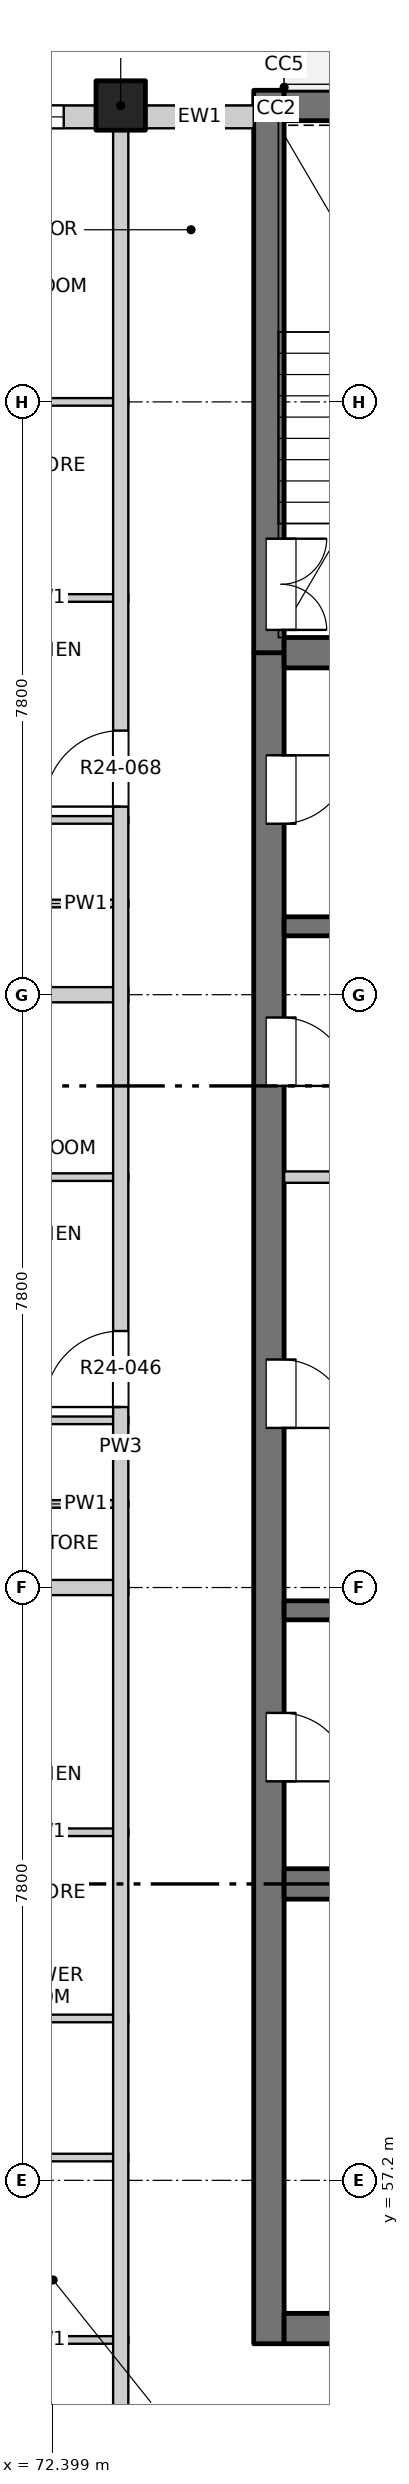
"""IFC4 building model, lengths in metres.
Left out: names, types, materials, properties, quantities, classifications, styles, units other than length and angle.
Written with IfcOpenShell. Run it as: python <this file> out.ifc"""

import sys

from ifc_helpers import new_model, si_unit, direction, frame, frame_2d, origin, origin_2d, place, context, subcontext, project, spatial, rectangle, extrude, element, fill, save


model = new_model("IFC4")
c1 = context("Model", 3, precision=1e-05, world=origin(), true_north=direction((0.0, 1.0)))
c2 = subcontext(c1, "Body", "Model", "MODEL_VIEW")
j1 = project(units=[si_unit("LENGTHUNIT", "METRE"), si_unit("PLANEANGLEUNIT", "RADIAN")], contexts=[c1])
p1 = place(None, origin())
s1 = spatial("IfcSite", under=j1, at=p1, CompositionType="ELEMENT")
p2 = place(p1, origin())
s2 = spatial("IfcBuilding", under=s1, at=p2, CompositionType="ELEMENT")
p3 = place(p2, frame((0.0, 0.0, 246.0)))
s3 = spatial("IfcBuildingStorey", under=s2, at=p3, CompositionType="ELEMENT", Elevation=246.0)
p4 = place(p3, frame((73.3, 84.5, -0.3), z_axis=(0.0, 0.0, 1.0), x_axis=(1.0, 0.0, 0.0)))
e1 = element("IfcColumn", 1, at=p4, inside=s3, PredefinedType="COLUMN", context=c2, shape_type="SweptSolid", body=[
    extrude(rectangle(XDim=0.65, YDim=0.65, at=origin_2d()), origin(), (0.0, 0.0, 1.0), 3.45),
])
p5 = place(p3, frame((75.25, 55.05, -0.3), z_axis=(0.0, 0.0, 1.0), x_axis=(0.0, 1.0, 0.0)))
e2 = element("IfcWall", 2, at=p5, inside=s3, PredefinedType="SOLIDWALL", context=c2, shape_type="SweptSolid", body=[
    extrude(rectangle(XDim=22.25, YDim=0.4, at=frame_2d((11.125, 0.0))), origin(), (0.0, 0.0, 1.0), 3.45),
])
p6 = place(p5, frame((7.4, 0.0, 0.3)))
e3 = element("IfcOpeningElement", 3, at=p6, cuts=e2, PredefinedType="OPENING", context=c2, shape_type="SweptSolid", body=[
    extrude(rectangle(XDim=0.9, YDim=2.1, at=frame_2d((0.45, 1.05))), frame((0.0, 0.21, 0.0), z_axis=(0.0, -1.0, 0.0), x_axis=(1.0, 0.0, 0.0)), (0.0, 0.0, 1.0), 0.42),
])
p7 = place(p5, frame((12.05, 0.0, 0.3)))
e4 = element("IfcOpeningElement", 4, at=p7, cuts=e2, PredefinedType="OPENING", context=c2, shape_type="SweptSolid", body=[
    extrude(rectangle(XDim=0.9, YDim=2.1, at=frame_2d((0.45, 1.05))), frame((0.0, 0.21, 0.0), z_axis=(0.0, -1.0, 0.0), x_axis=(1.0, 0.0, 0.0)), (0.0, 0.0, 1.0), 0.42),
])
p8 = place(p5, frame((16.55, 0.0, 0.3)))
e5 = element("IfcOpeningElement", 5, at=p8, cuts=e2, PredefinedType="OPENING", context=c2, shape_type="SweptSolid", body=[
    extrude(rectangle(XDim=0.9, YDim=2.1, at=frame_2d((0.45, 1.05))), frame((0.0, 0.21, 0.0), z_axis=(0.0, -1.0, 0.0), x_axis=(1.0, 0.0, 0.0)), (0.0, 0.0, 1.0), 0.42),
])
p9 = place(p5, frame((20.0, 0.0, 0.3)))
e6 = element("IfcOpeningElement", 6, at=p9, cuts=e2, PredefinedType="OPENING", context=c2, shape_type="SweptSolid", body=[
    extrude(rectangle(XDim=0.9, YDim=2.1, at=frame_2d((0.45, 1.05))), frame((0.0, 0.21, 0.0), z_axis=(0.0, -1.0, 0.0), x_axis=(1.0, 0.0, 0.0)), (0.0, 0.0, 1.0), 0.42),
])
p10 = place(p3, frame((75.25, 77.3, -0.3), z_axis=(0.0, 0.0, 1.0), x_axis=(0.0, 1.0, 0.0)))
e7 = element("IfcWall", 7, at=p10, inside=s3, PredefinedType="SOLIDWALL", context=c2, shape_type="SweptSolid", body=[
    extrude(rectangle(XDim=7.4, YDim=0.4, at=frame_2d((3.7, 0.0))), origin(), (0.0, 0.0, 1.0), 3.45),
])
p11 = place(p10, frame((0.3, 0.0, 0.3)))
e8 = element("IfcOpeningElement", 8, at=p11, cuts=e7, PredefinedType="OPENING", context=c2, shape_type="SweptSolid", body=[
    extrude(rectangle(XDim=1.2, YDim=2.1, at=frame_2d((0.6, 1.05))), frame((0.0, 0.21, 0.0), z_axis=(0.0, -1.0, 0.0), x_axis=(1.0, 0.0, 0.0)), (0.0, 0.0, 1.0), 0.42),
])
p12 = place(p3, frame((75.45, 55.25, -0.3), z_axis=(0.0, 0.0, 1.0), x_axis=(1.0, 0.0, 0.0)))
e9 = element("IfcWall", 9, at=p12, inside=s3, PredefinedType="SOLIDWALL", context=c2, shape_type="SweptSolid", body=[
    extrude(rectangle(XDim=19.1, YDim=0.4, at=frame_2d((9.55, 0.0))), origin(), (0.0, 0.0, 1.0), 3.45),
])
p13 = place(p12, frame((8.8, 0.0, 0.3)))
e10 = element("IfcOpeningElement", 10, at=p13, cuts=e9, PredefinedType="OPENING", context=c2, shape_type="SweptSolid", body=[
    extrude(rectangle(XDim=1.5, YDim=2.1, at=frame_2d((0.75, 1.05))), frame((0.0, 0.21, 0.0), z_axis=(0.0, -1.0, 0.0), x_axis=(1.0, 0.0, 0.0)), (0.0, 0.0, 1.0), 0.42),
])
p14 = place(p3, frame((75.45, 84.5, -0.3), z_axis=(0.0, 0.0, 1.0), x_axis=(1.0, 0.0, 0.0)))
e11 = element("IfcWall", 11, at=p14, inside=s3, PredefinedType="SOLIDWALL", context=c2, shape_type="SweptSolid", body=[
    extrude(rectangle(XDim=19.1, YDim=0.4, at=frame_2d((9.55, 0.0))), origin(), (0.0, 0.0, 1.0), 3.45),
])
p15 = place(p3, frame((75.45, 61.1, -0.3), z_axis=(0.0, 0.0, 1.0), x_axis=(1.0, 0.0, 0.0)))
e12 = element("IfcWall", 12, at=p15, inside=s3, PredefinedType="SOLIDWALL", context=c2, shape_type="SweptSolid", body=[
    extrude(rectangle(XDim=3.875, YDim=0.4, at=frame_2d((1.938, 0.0))), origin(), (0.0, 0.0, 1.0), 3.45),
])
for number, where, z_axis, x_axis in (
    (13, (75.45, 64.7, -0.3), (0.0, 0.0, 1.0), (1.0, 0.0, 0.0)),
    (14, (75.45, 73.7, -0.3), (0.0, 0.0, 1.0), (1.0, 0.0, 0.0)),
):
    element("IfcWall", number, at=place(p3, frame(where, z_axis=z_axis, x_axis=x_axis)), inside=s3, PredefinedType="SOLIDWALL", context=c2, shape_type="SweptSolid", body=[
        extrude(rectangle(XDim=3.875, YDim=0.25, at=frame_2d((1.938, 0.0))), origin(), (0.0, 0.0, 1.0), 3.45),
    ])
p16 = place(p3, frame((75.45, 77.3, -0.3), z_axis=(0.0, 0.0, 1.0), x_axis=(1.0, 0.0, 0.0)))
e15 = element("IfcWall", 15, at=p16, inside=s3, PredefinedType="SOLIDWALL", context=c2, shape_type="SweptSolid", body=[
    extrude(rectangle(XDim=3.875, YDim=0.4, at=frame_2d((1.938, 0.0))), origin(), (0.0, 0.0, 1.0), 3.45),
])
p17 = place(p3, frame((69.4, 84.35, 0.0), z_axis=(0.0, 0.0, 1.0), x_axis=(1.0, 0.0, 0.0)))
e16 = element("IfcWall", 16, at=p17, inside=s3, PredefinedType="SOLIDWALL", context=c2, shape_type="SweptSolid", body=[
    extrude(rectangle(XDim=3.575, YDim=0.3, at=frame_2d((1.788, 0.0))), origin(), (0.0, 0.0, 1.0), 2.7),
])
p18 = place(p17, frame((0.75, 0.0, 0.9)))
e17 = element("IfcOpeningElement", 17, at=p18, cuts=e16, PredefinedType="OPENING", context=c2, shape_type="SweptSolid", body=[
    extrude(rectangle(XDim=2.4, YDim=1.8, at=frame_2d((1.2, 0.9))), frame((0.0, 0.16, 0.0), z_axis=(0.0, -1.0, 0.0), x_axis=(1.0, 0.0, 0.0)), (0.0, 0.0, 1.0), 0.32),
])
p19 = place(p3, frame((73.625, 84.35, 0.0), z_axis=(0.0, 0.0, 1.0), x_axis=(1.0, 0.0, 0.0)))
e18 = element("IfcWall", 18, at=p19, inside=s3, PredefinedType="SOLIDWALL", context=c2, shape_type="SweptSolid", body=[
    extrude(rectangle(XDim=1.425, YDim=0.3, at=frame_2d((0.712, 0.0))), origin(), (0.0, 0.0, 1.0), 2.7),
])
for number, where, z_axis, x_axis in (
    (19, (71.18, 55.1, 0.0), (0.0, 0.0, 1.0), (1.0, 0.0, 0.0)),
    (20, (71.18, 57.5, 0.0), (0.0, 0.0, 1.0), (1.0, 0.0, 0.0)),
    (21, (71.18, 59.33, 0.0), (0.0, 0.0, 1.0), (1.0, 0.0, 0.0)),
    (22, (71.18, 61.78, 0.0), (0.0, 0.0, 1.0), (1.0, 0.0, 0.0)),
):
    element("IfcWall", number, at=place(p3, frame(where, z_axis=z_axis, x_axis=x_axis)), inside=s3, PredefinedType="PARTITIONING", context=c2, shape_type="SweptSolid", body=[
        extrude(rectangle(XDim=2.22, YDim=0.1, at=frame_2d((1.11, 0.0))), origin(), (0.0, 0.0, 1.0), 3.15),
    ])
p20 = place(p3, frame((65.8, 65.0, 0.0), z_axis=(0.0, 0.0, 1.0), x_axis=(1.0, 0.0, 0.0)))
e23 = element("IfcWall", 23, at=p20, inside=s3, PredefinedType="PARTITIONING", context=c2, shape_type="SweptSolid", body=[
    extrude(rectangle(XDim=7.6, YDim=0.2, at=frame_2d((3.8, 0.0))), origin(), (0.0, 0.0, 1.0), 3.15),
])
for number, where, z_axis, x_axis in (
    (24, (71.18, 66.1, 0.0), (0.0, 0.0, 1.0), (1.0, 0.0, 0.0)),
    (25, (71.18, 67.2, 0.0), (0.0, 0.0, 1.0), (1.0, 0.0, 0.0)),
    (26, (71.18, 70.4, 0.0), (0.0, 0.0, 1.0), (1.0, 0.0, 0.0)),
):
    element("IfcWall", number, at=place(p3, frame(where, z_axis=z_axis, x_axis=x_axis)), inside=s3, PredefinedType="PARTITIONING", context=c2, shape_type="SweptSolid", body=[
        extrude(rectangle(XDim=2.22, YDim=0.1, at=frame_2d((1.11, 0.0))), origin(), (0.0, 0.0, 1.0), 3.15),
    ])
p21 = place(p3, frame((75.45, 70.4, 0.0), z_axis=(0.0, 0.0, 1.0), x_axis=(1.0, 0.0, 0.0)))
e27 = element("IfcWall", 27, at=p21, inside=s3, PredefinedType="PARTITIONING", context=c2, shape_type="SweptSolid", body=[
    extrude(rectangle(XDim=3.875, YDim=0.15, at=frame_2d((1.938, 0.0))), origin(), (0.0, 0.0, 1.0), 3.15),
])
p22 = place(p3, frame((65.8, 72.8, 0.0), z_axis=(0.0, 0.0, 1.0), x_axis=(1.0, 0.0, 0.0)))
e28 = element("IfcWall", 28, at=p22, inside=s3, PredefinedType="PARTITIONING", context=c2, shape_type="SweptSolid", body=[
    extrude(rectangle(XDim=7.6, YDim=0.2, at=frame_2d((3.8, 0.0))), origin(), (0.0, 0.0, 1.0), 3.15),
])
for number, where, z_axis, x_axis in (
    (29, (71.18, 74.0, 0.0), (0.0, 0.0, 1.0), (1.0, 0.0, 0.0)),
    (30, (71.18, 75.1, 0.0), (0.0, 0.0, 1.0), (1.0, 0.0, 0.0)),
    (31, (71.18, 78.02, 0.0), (0.0, 0.0, 1.0), (1.0, 0.0, 0.0)),
):
    element("IfcWall", number, at=place(p3, frame(where, z_axis=z_axis, x_axis=x_axis)), inside=s3, PredefinedType="PARTITIONING", context=c2, shape_type="SweptSolid", body=[
        extrude(rectangle(XDim=2.22, YDim=0.1, at=frame_2d((1.11, 0.0))), origin(), (0.0, 0.0, 1.0), 3.15),
    ])
p23 = place(p3, frame((65.8, 80.6, 0.0), z_axis=(0.0, 0.0, 1.0), x_axis=(1.0, 0.0, 0.0)))
e32 = element("IfcWall", 32, at=p23, inside=s3, PredefinedType="PARTITIONING", context=c2, shape_type="SweptSolid", body=[
    extrude(rectangle(XDim=7.6, YDim=0.1, at=frame_2d((3.8, 0.0))), origin(), (0.0, 0.0, 1.0), 3.15),
])
p24 = place(p23, frame((4.09, 0.0, 0.0)))
e33 = element("IfcOpeningElement", 33, at=p24, cuts=e32, PredefinedType="OPENING", context=c2, shape_type="SweptSolid", body=[
    extrude(rectangle(XDim=0.9, YDim=2.1, at=frame_2d((0.45, 1.05))), frame((0.0, 0.06, 0.0), z_axis=(0.0, -1.0, 0.0), x_axis=(1.0, 0.0, 0.0)), (0.0, 0.0, 1.0), 0.12),
])
p25 = place(p3, frame((73.3, 49.5, 0.0), z_axis=(0.0, 0.0, 1.0), x_axis=(0.0, 1.0, 0.0)))
e34 = element("IfcWall", 34, at=p25, inside=s3, PredefinedType="PARTITIONING", context=c2, shape_type="SweptSolid", body=[
    extrude(rectangle(XDim=34.7, YDim=0.2, at=frame_2d((17.35, 0.0))), origin(), (0.0, 0.0, 1.0), 3.15),
])
p26 = place(p25, frame((3.325, 0.0, 0.0)))
e35 = element("IfcOpeningElement", 35, at=p26, cuts=e34, PredefinedType="OPENING", context=c2, shape_type="SweptSolid", body=[
    extrude(rectangle(XDim=1.0, YDim=2.1, at=frame_2d((0.5, 1.05))), frame((0.0, 0.11, 0.0), z_axis=(0.0, -1.0, 0.0), x_axis=(1.0, 0.0, 0.0)), (0.0, 0.0, 1.0), 0.22),
])
p27 = place(p25, frame((17.875, 0.0, 0.0)))
e36 = element("IfcOpeningElement", 36, at=p27, cuts=e34, PredefinedType="OPENING", context=c2, shape_type="SweptSolid", body=[
    extrude(rectangle(XDim=1.0, YDim=2.1, at=frame_2d((0.5, 1.05))), frame((0.0, 0.11, 0.0), z_axis=(0.0, -1.0, 0.0), x_axis=(1.0, 0.0, 0.0)), (0.0, 0.0, 1.0), 0.22),
])
p28 = place(p25, frame((25.775, 0.0, 0.0)))
e37 = element("IfcOpeningElement", 37, at=p28, cuts=e34, PredefinedType="OPENING", context=c2, shape_type="SweptSolid", body=[
    extrude(rectangle(XDim=1.0, YDim=2.1, at=frame_2d((0.5, 1.05))), frame((0.0, 0.11, 0.0), z_axis=(0.0, -1.0, 0.0), x_axis=(1.0, 0.0, 0.0)), (0.0, 0.0, 1.0), 0.22),
])
p29 = place(p18, origin())
e38 = element("IfcWindow", 38, at=p29, inside=s3, PartitioningType="DOUBLE_PANEL_VERTICAL", PredefinedType="WINDOW", context=c2, shape_type="SweptSolid", body=[
    extrude(rectangle(XDim=2.4, YDim=1.8, at=frame_2d((1.2, 0.9))), frame((0.0, 0.03, 0.0), z_axis=(0.0, -1.0, 0.0), x_axis=(1.0, 0.0, 0.0)), (0.0, 0.0, 1.0), 0.06),
])
fill(e17, e38)
p30 = place(p6, origin())
e39 = element("IfcDoor", 39, at=p30, inside=s3, OperationType="SINGLE_SWING_RIGHT", PredefinedType="DOOR", context=c2, shape_type="SweptSolid", body=[
    extrude(rectangle(XDim=0.9, YDim=2.1, at=frame_2d((0.45, 1.05))), frame((0.0, -0.135, 0.0), z_axis=(0.0, -1.0, 0.0), x_axis=(1.0, 0.0, 0.0)), (0.0, 0.0, 1.0), 0.05),
])
fill(e3, e39)
p31 = place(p7, origin())
e40 = element("IfcDoor", 40, at=p31, inside=s3, OperationType="SINGLE_SWING_RIGHT", PredefinedType="DOOR", context=c2, shape_type="SweptSolid", body=[
    extrude(rectangle(XDim=0.9, YDim=2.1, at=frame_2d((0.45, 1.05))), frame((0.0, -0.135, 0.0), z_axis=(0.0, -1.0, 0.0), x_axis=(1.0, 0.0, 0.0)), (0.0, 0.0, 1.0), 0.05),
])
fill(e4, e40)
p32 = place(p27, origin())
e41 = element("IfcDoor", 41, at=p32, inside=s3, OperationType="SINGLE_SWING_RIGHT", PredefinedType="DOOR", context=c2, shape_type="SweptSolid", body=[
    extrude(rectangle(XDim=1.0, YDim=2.1, at=frame_2d((0.5, 1.05))), frame((0.0, 0.025, 0.0), z_axis=(0.0, -1.0, 0.0), x_axis=(1.0, 0.0, 0.0)), (0.0, 0.0, 1.0), 0.05),
])
fill(e36, e41)
p33 = place(p8, origin())
e42 = element("IfcDoor", 42, at=p33, inside=s3, OperationType="SINGLE_SWING_RIGHT", PredefinedType="DOOR", context=c2, shape_type="SweptSolid", body=[
    extrude(rectangle(XDim=0.9, YDim=2.1, at=frame_2d((0.45, 1.05))), frame((0.0, -0.135, 0.0), z_axis=(0.0, -1.0, 0.0), x_axis=(1.0, 0.0, 0.0)), (0.0, 0.0, 1.0), 0.05),
])
fill(e5, e42)
p34 = place(p9, origin())
e43 = element("IfcDoor", 43, at=p34, inside=s3, OperationType="SINGLE_SWING_LEFT", PredefinedType="DOOR", context=c2, shape_type="SweptSolid", body=[
    extrude(rectangle(XDim=0.9, YDim=2.1, at=frame_2d((0.45, 1.05))), frame((0.0, -0.135, 0.0), z_axis=(0.0, -1.0, 0.0), x_axis=(1.0, 0.0, 0.0)), (0.0, 0.0, 1.0), 0.05),
])
fill(e6, e43)
p35 = place(p28, origin())
e44 = element("IfcDoor", 44, at=p35, inside=s3, OperationType="SINGLE_SWING_RIGHT", PredefinedType="DOOR", context=c2, shape_type="SweptSolid", body=[
    extrude(rectangle(XDim=1.0, YDim=2.1, at=frame_2d((0.5, 1.05))), frame((0.0, 0.025, 0.0), z_axis=(0.0, -1.0, 0.0), x_axis=(1.0, 0.0, 0.0)), (0.0, 0.0, 1.0), 0.05),
])
fill(e37, e44)
p36 = place(p11, origin())
e45 = element("IfcDoor", 45, at=p36, inside=s3, OperationType="DOUBLE_DOOR_SINGLE_SWING", PredefinedType="DOOR", context=c2, shape_type="SweptSolid", body=[
    extrude(rectangle(XDim=1.2, YDim=2.1, at=frame_2d((0.6, 1.05))), frame((0.0, -0.135, 0.0), z_axis=(0.0, -1.0, 0.0), x_axis=(1.0, 0.0, 0.0)), (0.0, 0.0, 1.0), 0.05),
])
fill(e8, e45)
save(model, sys.argv[1])
